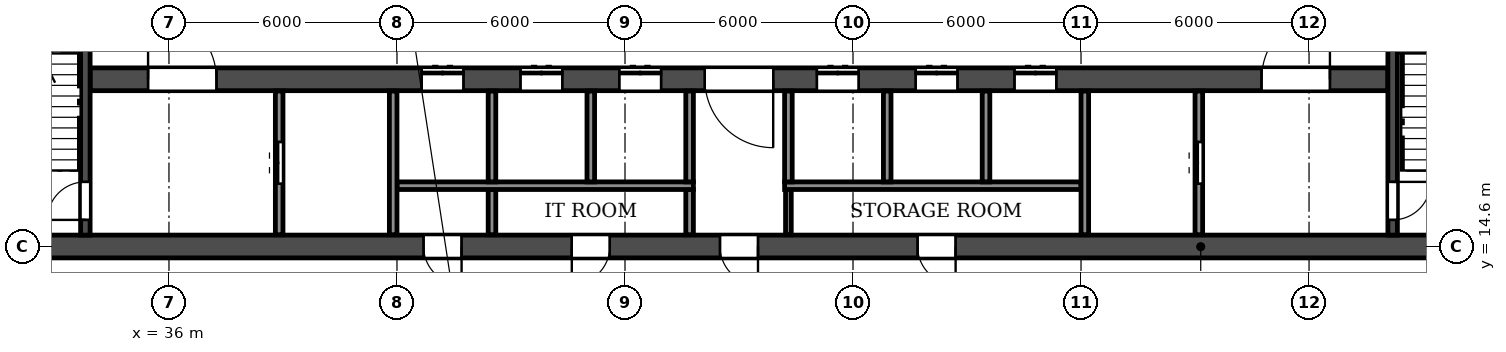
"""IFC4 building model, lengths in metres.
Left out: names, types, materials, properties, quantities, classifications, styles, units other than length and angle.
Written with IfcOpenShell. Run it as: python <this file> out.ifc"""

import sys

from ifc_helpers import new_model, si_unit, direction, frame, frame_2d, origin, place, context, subcontext, project, spatial, rectangle, extrude, element, fill, save


model = new_model("IFC4")
c1 = context("Model", 3, precision=1e-05, world=origin(), true_north=direction((0.0, 1.0)))
c2 = subcontext(c1, "Body", "Model", "MODEL_VIEW")
j1 = project(units=[si_unit("LENGTHUNIT", "METRE"), si_unit("PLANEANGLEUNIT", "RADIAN")], contexts=[c1])
p1 = place(None, origin())
s1 = spatial("IfcSite", under=j1, at=p1, CompositionType="ELEMENT")
p2 = place(p1, origin())
s2 = spatial("IfcBuilding", under=s1, at=p2, CompositionType="ELEMENT")
p3 = place(p2, frame((0.0, 0.0, 26.7)))
s3 = spatial("IfcBuildingStorey", under=s2, at=p3, CompositionType="ELEMENT", Elevation=26.7)
p4 = place(p3, frame((2.6, 14.6, 0.0), z_axis=(0.0, 0.0, 1.0), x_axis=(1.0, 0.0, 0.0)))
e1 = element("IfcWall", 1, at=p4, inside=s3, PredefinedType="SOLIDWALL", context=c2, shape_type="SweptSolid", body=[
    extrude(rectangle(XDim=96.8, YDim=0.6, at=frame_2d((48.4, 0.0))), origin(), (0.0, 0.0, 1.0), 3.05),
])
p5 = place(p4, frame((7.2, 0.0, 0.0)))
e2 = element("IfcOpeningElement", 2, at=p5, cuts=e1, PredefinedType="OPENING", context=c2, shape_type="SweptSolid", body=[
    extrude(rectangle(XDim=1.0, YDim=2.1, at=frame_2d((0.5, 1.05))), frame((0.0, 0.31, 0.0), z_axis=(0.0, -1.0, 0.0), x_axis=(1.0, 0.0, 0.0)), (0.0, 0.0, 1.0), 0.62),
])
p6 = place(p4, frame((16.3, 0.0, 0.0)))
e3 = element("IfcOpeningElement", 3, at=p6, cuts=e1, PredefinedType="OPENING", context=c2, shape_type="SweptSolid", body=[
    extrude(rectangle(XDim=1.0, YDim=2.1, at=frame_2d((0.5, 1.05))), frame((0.0, 0.31, 0.0), z_axis=(0.0, -1.0, 0.0), x_axis=(1.0, 0.0, 0.0)), (0.0, 0.0, 1.0), 0.62),
])
p7 = place(p4, frame((24.2, 0.0, 0.0)))
e4 = element("IfcOpeningElement", 4, at=p7, cuts=e1, PredefinedType="OPENING", context=c2, shape_type="SweptSolid", body=[
    extrude(rectangle(XDim=1.0, YDim=2.1, at=frame_2d((0.5, 1.05))), frame((0.0, 0.31, 0.0), z_axis=(0.0, -1.0, 0.0), x_axis=(1.0, 0.0, 0.0)), (0.0, 0.0, 1.0), 0.62),
])
p8 = place(p4, frame((28.8, 0.0, 0.0)))
e5 = element("IfcOpeningElement", 5, at=p8, cuts=e1, PredefinedType="OPENING", context=c2, shape_type="SweptSolid", body=[
    extrude(rectangle(XDim=1.0, YDim=2.1, at=frame_2d((0.5, 1.05))), frame((0.0, 0.31, 0.0), z_axis=(0.0, -1.0, 0.0), x_axis=(1.0, 0.0, 0.0)), (0.0, 0.0, 1.0), 0.62),
])
p9 = place(p4, frame((40.1, 0.0, 0.0)))
e6 = element("IfcOpeningElement", 6, at=p9, cuts=e1, PredefinedType="OPENING", context=c2, shape_type="SweptSolid", body=[
    extrude(rectangle(XDim=1.0, YDim=2.1, at=frame_2d((0.5, 1.05))), frame((0.0, 0.31, 0.0), z_axis=(0.0, -1.0, 0.0), x_axis=(1.0, 0.0, 0.0)), (0.0, 0.0, 1.0), 0.62),
])
p10 = place(p4, frame((44.0, 0.0, 0.0)))
e7 = element("IfcOpeningElement", 7, at=p10, cuts=e1, PredefinedType="OPENING", context=c2, shape_type="SweptSolid", body=[
    extrude(rectangle(XDim=1.0, YDim=2.1, at=frame_2d((0.5, 1.05))), frame((0.0, 0.31, 0.0), z_axis=(0.0, -1.0, 0.0), x_axis=(1.0, 0.0, 0.0)), (0.0, 0.0, 1.0), 0.62),
])
p11 = place(p4, frame((47.9, 0.0, 0.0)))
e8 = element("IfcOpeningElement", 8, at=p11, cuts=e1, PredefinedType="OPENING", context=c2, shape_type="SweptSolid", body=[
    extrude(rectangle(XDim=1.0, YDim=2.1, at=frame_2d((0.5, 1.05))), frame((0.0, 0.31, 0.0), z_axis=(0.0, -1.0, 0.0), x_axis=(1.0, 0.0, 0.0)), (0.0, 0.0, 1.0), 0.62),
])
p12 = place(p4, frame((53.1, 0.0, 0.0)))
e9 = element("IfcOpeningElement", 9, at=p12, cuts=e1, PredefinedType="OPENING", context=c2, shape_type="SweptSolid", body=[
    extrude(rectangle(XDim=1.0, YDim=2.1, at=frame_2d((0.5, 1.05))), frame((0.0, 0.31, 0.0), z_axis=(0.0, -1.0, 0.0), x_axis=(1.0, 0.0, 0.0)), (0.0, 0.0, 1.0), 0.62),
])
p13 = place(p4, frame((67.0, 0.0, 0.0)))
e10 = element("IfcOpeningElement", 10, at=p13, cuts=e1, PredefinedType="OPENING", context=c2, shape_type="SweptSolid", body=[
    extrude(rectangle(XDim=1.0, YDim=2.1, at=frame_2d((0.5, 1.05))), frame((0.0, 0.31, 0.0), z_axis=(0.0, -1.0, 0.0), x_axis=(1.0, 0.0, 0.0)), (0.0, 0.0, 1.0), 0.62),
])
p14 = place(p4, frame((71.6, 0.0, 0.0)))
e11 = element("IfcOpeningElement", 11, at=p14, cuts=e1, PredefinedType="OPENING", context=c2, shape_type="SweptSolid", body=[
    extrude(rectangle(XDim=1.0, YDim=2.1, at=frame_2d((0.5, 1.05))), frame((0.0, 0.31, 0.0), z_axis=(0.0, -1.0, 0.0), x_axis=(1.0, 0.0, 0.0)), (0.0, 0.0, 1.0), 0.62),
])
p15 = place(p4, frame((79.5, 0.0, 0.0)))
e12 = element("IfcOpeningElement", 12, at=p15, cuts=e1, PredefinedType="OPENING", context=c2, shape_type="SweptSolid", body=[
    extrude(rectangle(XDim=1.0, YDim=2.1, at=frame_2d((0.5, 1.05))), frame((0.0, 0.31, 0.0), z_axis=(0.0, -1.0, 0.0), x_axis=(1.0, 0.0, 0.0)), (0.0, 0.0, 1.0), 0.62),
])
p16 = place(p4, frame((83.15, 0.0, 0.0)))
e13 = element("IfcOpeningElement", 13, at=p16, cuts=e1, PredefinedType="OPENING", context=c2, shape_type="SweptSolid", body=[
    extrude(rectangle(XDim=1.0, YDim=2.1, at=frame_2d((0.5, 1.05))), frame((0.0, 0.31, 0.0), z_axis=(0.0, -1.0, 0.0), x_axis=(1.0, 0.0, 0.0)), (0.0, 0.0, 1.0), 0.62),
])
p17 = place(p4, frame((90.85, 0.0, 0.0)))
e14 = element("IfcOpeningElement", 14, at=p17, cuts=e1, PredefinedType="OPENING", context=c2, shape_type="SweptSolid", body=[
    extrude(rectangle(XDim=1.0, YDim=2.1, at=frame_2d((0.5, 1.05))), frame((0.0, 0.31, 0.0), z_axis=(0.0, -1.0, 0.0), x_axis=(1.0, 0.0, 0.0)), (0.0, 0.0, 1.0), 0.62),
])
p18 = place(p3, frame((33.925, 19.0, 0.0), z_axis=(0.0, 0.0, 1.0), x_axis=(1.0, 0.0, 0.0)))
e15 = element("IfcWall", 15, at=p18, inside=s3, PredefinedType="SOLIDWALL", context=c2, shape_type="SweptSolid", body=[
    extrude(rectangle(XDim=34.15, YDim=0.6, at=frame_2d((17.075, 0.0))), origin(), (0.0, 0.0, 1.0), 3.05),
])
p19 = place(p18, frame((16.175, 0.0, 0.0)))
e16 = element("IfcOpeningElement", 16, at=p19, cuts=e15, PredefinedType="OPENING", context=c2, shape_type="SweptSolid", body=[
    extrude(rectangle(XDim=1.8, YDim=2.1, at=frame_2d((0.9, 1.05))), frame((0.0, 0.31, 0.0), z_axis=(0.0, -1.0, 0.0), x_axis=(1.0, 0.0, 0.0)), (0.0, 0.0, 1.0), 0.62),
])
p20 = place(p18, frame((1.525, 0.0, 0.0)))
e17 = element("IfcOpeningElement", 17, at=p20, cuts=e15, PredefinedType="OPENING", context=c2, shape_type="SweptSolid", body=[
    extrude(rectangle(XDim=1.8, YDim=2.1, at=frame_2d((0.9, 1.05))), frame((0.0, 0.31, 0.0), z_axis=(0.0, -1.0, 0.0), x_axis=(1.0, 0.0, 0.0)), (0.0, 0.0, 1.0), 0.62),
])
p21 = place(p18, frame((8.725, 0.0, 0.0)))
e18 = element("IfcOpeningElement", 18, at=p21, cuts=e15, PredefinedType="OPENING", context=c2, shape_type="SweptSolid", body=[
    extrude(rectangle(XDim=1.1, YDim=2.1, at=frame_2d((0.55, 1.05))), frame((0.0, 0.31, 0.0), z_axis=(0.0, -1.0, 0.0), x_axis=(1.0, 0.0, 0.0)), (0.0, 0.0, 1.0), 0.62),
])
p22 = place(p18, frame((11.325, 0.0, 0.0)))
e19 = element("IfcOpeningElement", 19, at=p22, cuts=e15, PredefinedType="OPENING", context=c2, shape_type="SweptSolid", body=[
    extrude(rectangle(XDim=1.1, YDim=2.1, at=frame_2d((0.55, 1.05))), frame((0.0, 0.31, 0.0), z_axis=(0.0, -1.0, 0.0), x_axis=(1.0, 0.0, 0.0)), (0.0, 0.0, 1.0), 0.62),
])
p23 = place(p18, frame((13.925, 0.0, 0.0)))
e20 = element("IfcOpeningElement", 20, at=p23, cuts=e15, PredefinedType="OPENING", context=c2, shape_type="SweptSolid", body=[
    extrude(rectangle(XDim=1.1, YDim=2.1, at=frame_2d((0.55, 1.05))), frame((0.0, 0.31, 0.0), z_axis=(0.0, -1.0, 0.0), x_axis=(1.0, 0.0, 0.0)), (0.0, 0.0, 1.0), 0.62),
])
p24 = place(p18, frame((19.125, 0.0, 0.0)))
e21 = element("IfcOpeningElement", 21, at=p24, cuts=e15, PredefinedType="OPENING", context=c2, shape_type="SweptSolid", body=[
    extrude(rectangle(XDim=1.1, YDim=2.1, at=frame_2d((0.55, 1.05))), frame((0.0, 0.31, 0.0), z_axis=(0.0, -1.0, 0.0), x_axis=(1.0, 0.0, 0.0)), (0.0, 0.0, 1.0), 0.62),
])
p25 = place(p18, frame((21.725, 0.0, 0.0)))
e22 = element("IfcOpeningElement", 22, at=p25, cuts=e15, PredefinedType="OPENING", context=c2, shape_type="SweptSolid", body=[
    extrude(rectangle(XDim=1.1, YDim=2.1, at=frame_2d((0.55, 1.05))), frame((0.0, 0.31, 0.0), z_axis=(0.0, -1.0, 0.0), x_axis=(1.0, 0.0, 0.0)), (0.0, 0.0, 1.0), 0.62),
])
p26 = place(p18, frame((24.325, 0.0, 0.0)))
e23 = element("IfcOpeningElement", 23, at=p26, cuts=e15, PredefinedType="OPENING", context=c2, shape_type="SweptSolid", body=[
    extrude(rectangle(XDim=1.1, YDim=2.1, at=frame_2d((0.55, 1.05))), frame((0.0, 0.31, 0.0), z_axis=(0.0, -1.0, 0.0), x_axis=(1.0, 0.0, 0.0)), (0.0, 0.0, 1.0), 0.62),
])
p27 = place(p18, frame((30.825, 0.0, 0.0)))
e24 = element("IfcOpeningElement", 24, at=p27, cuts=e15, PredefinedType="OPENING", context=c2, shape_type="SweptSolid", body=[
    extrude(rectangle(XDim=1.8, YDim=2.1, at=frame_2d((0.9, 1.05))), frame((0.0, 0.31, 0.0), z_axis=(0.0, -1.0, 0.0), x_axis=(1.0, 0.0, 0.0)), (0.0, 0.0, 1.0), 0.62),
])
p28 = place(p3, frame((33.8, 14.9, 0.0), z_axis=(0.0, 0.0, 1.0), x_axis=(0.0, 1.0, 0.0)))
e25 = element("IfcWall", 25, at=p28, inside=s3, PredefinedType="SOLIDWALL", context=c2, shape_type="SweptSolid", body=[
    extrude(rectangle(XDim=7.575, YDim=0.25, at=frame_2d((3.788, 0.0))), origin(), (0.0, 0.0, 1.0), 3.05),
])
p29 = place(p28, frame((0.4, 0.0, 0.0)))
e26 = element("IfcOpeningElement", 26, at=p29, cuts=e25, PredefinedType="OPENING", context=c2, shape_type="SweptSolid", body=[
    extrude(rectangle(XDim=1.0, YDim=2.1, at=frame_2d((0.5, 1.05))), frame((0.0, 0.135, 0.0), z_axis=(0.0, -1.0, 0.0), x_axis=(1.0, 0.0, 0.0)), (0.0, 0.0, 1.0), 0.27),
])
p30 = place(p3, frame((68.2, 14.9, 0.0), z_axis=(0.0, 0.0, 1.0), x_axis=(0.0, 1.0, 0.0)))
e27 = element("IfcWall", 27, at=p30, inside=s3, PredefinedType="SOLIDWALL", context=c2, shape_type="SweptSolid", body=[
    extrude(rectangle(XDim=7.575, YDim=0.25, at=frame_2d((3.788, 0.0))), origin(), (0.0, 0.0, 1.0), 3.05),
])
p31 = place(p30, frame((0.4, 0.0, 0.0)))
e28 = element("IfcOpeningElement", 28, at=p31, cuts=e27, PredefinedType="OPENING", context=c2, shape_type="SweptSolid", body=[
    extrude(rectangle(XDim=1.0, YDim=2.1, at=frame_2d((0.5, 1.05))), frame((0.0, 0.135, 0.0), z_axis=(0.0, -1.0, 0.0), x_axis=(1.0, 0.0, 0.0)), (0.0, 0.0, 1.0), 0.27),
])
p32 = place(p3, frame((52.3, 14.91, 0.0), z_axis=(0.0, 0.0, 1.0), x_axis=(0.0, 1.0, 0.0)))
e29 = element("IfcWall", 29, at=p32, inside=s3, PredefinedType="PARTITIONING", context=c2, shape_type="SweptSolid", body=[
    extrude(rectangle(XDim=1.19, YDim=0.15, at=frame_2d((0.595, 0.0))), origin(), (0.0, 0.0, 1.0), 3.05),
])
for number, where, z_axis, x_axis in (
    (30, (44.5, 14.91, 0.0), (0.0, 0.0, 1.0), (0.0, 1.0, 0.0)),
    (31, (49.7, 14.91, 0.0), (0.0, 0.0, 1.0), (0.0, 1.0, 0.0)),
):
    element("IfcWall", number, at=place(p3, frame(where, z_axis=z_axis, x_axis=x_axis)), inside=s3, PredefinedType="PARTITIONING", context=c2, shape_type="SweptSolid", body=[
        extrude(rectangle(XDim=1.19, YDim=0.2, at=frame_2d((0.595, 0.0))), origin(), (0.0, 0.0, 1.0), 3.05),
    ])
for number, where, z_axis, x_axis in (
    (32, (42.0, 16.2, 0.0), (0.0, 0.0, 1.0), (1.0, 0.0, 0.0)),
    (33, (52.2, 16.2, 0.0), (0.0, 0.0, 1.0), (1.0, 0.0, 0.0)),
):
    element("IfcWall", number, at=place(p3, frame(where, z_axis=z_axis, x_axis=x_axis)), inside=s3, PredefinedType="PARTITIONING", context=c2, shape_type="SweptSolid", body=[
        extrude(rectangle(XDim=7.8, YDim=0.2, at=frame_2d((3.9, 0.0))), origin(), (0.0, 0.0, 1.0), 3.05),
    ])
p33 = place(p3, frame((38.9, 14.91, 0.0), z_axis=(0.0, 0.0, 1.0), x_axis=(0.0, 1.0, 0.0)))
e34 = element("IfcWall", 34, at=p33, inside=s3, PredefinedType="PARTITIONING", context=c2, shape_type="SweptSolid", body=[
    extrude(rectangle(XDim=3.78, YDim=0.2, at=frame_2d((1.89, 0.0))), origin(), (0.0, 0.0, 1.0), 3.05),
])
p34 = place(p33, frame((1.34, 0.0, 0.0)))
e35 = element("IfcOpeningElement", 35, at=p34, cuts=e34, PredefinedType="OPENING", context=c2, shape_type="SweptSolid", body=[
    extrude(rectangle(XDim=1.1, YDim=2.1, at=frame_2d((0.55, 1.05))), frame((0.0, 0.11, 0.0), z_axis=(0.0, -1.0, 0.0), x_axis=(1.0, 0.0, 0.0)), (0.0, 0.0, 1.0), 0.22),
])
p35 = place(p3, frame((41.9, 14.91, 0.0), z_axis=(0.0, 0.0, 1.0), x_axis=(0.0, 1.0, 0.0)))
e36 = element("IfcWall", 36, at=p35, inside=s3, PredefinedType="PARTITIONING", context=c2, shape_type="SweptSolid", body=[
    extrude(rectangle(XDim=3.78, YDim=0.2, at=frame_2d((1.89, 0.0))), origin(), (0.0, 0.0, 1.0), 3.05),
])
for number, where, z_axis, x_axis in (
    (37, (44.5, 16.3, 0.0), (0.0, 0.0, 1.0), (0.0, 1.0, 0.0)),
    (38, (47.1, 16.3, 0.0), (0.0, 0.0, 1.0), (0.0, 1.0, 0.0)),
    (39, (49.7, 16.3, 0.0), (0.0, 0.0, 1.0), (0.0, 1.0, 0.0)),
    (40, (52.3, 16.3, 0.0), (0.0, 0.0, 1.0), (0.0, 1.0, 0.0)),
    (41, (54.9, 16.3, 0.0), (0.0, 0.0, 1.0), (0.0, 1.0, 0.0)),
    (42, (57.5, 16.3, 0.0), (0.0, 0.0, 1.0), (0.0, 1.0, 0.0)),
):
    element("IfcWall", number, at=place(p3, frame(where, z_axis=z_axis, x_axis=x_axis)), inside=s3, PredefinedType="PARTITIONING", context=c2, shape_type="SweptSolid", body=[
        extrude(rectangle(XDim=2.39, YDim=0.2, at=frame_2d((1.195, 0.0))), origin(), (0.0, 0.0, 1.0), 3.05),
    ])
p36 = place(p3, frame((60.1, 14.91, 0.0), z_axis=(0.0, 0.0, 1.0), x_axis=(0.0, 1.0, 0.0)))
e43 = element("IfcWall", 43, at=p36, inside=s3, PredefinedType="PARTITIONING", context=c2, shape_type="SweptSolid", body=[
    extrude(rectangle(XDim=3.78, YDim=0.2, at=frame_2d((1.89, 0.0))), origin(), (0.0, 0.0, 1.0), 3.05),
])
p37 = place(p3, frame((63.1, 14.91, 0.0), z_axis=(0.0, 0.0, 1.0), x_axis=(0.0, 1.0, 0.0)))
e44 = element("IfcWall", 44, at=p37, inside=s3, PredefinedType="PARTITIONING", context=c2, shape_type="SweptSolid", body=[
    extrude(rectangle(XDim=3.78, YDim=0.2, at=frame_2d((1.89, 0.0))), origin(), (0.0, 0.0, 1.0), 3.05),
])
p38 = place(p37, frame((1.34, 0.0, 0.0)))
e45 = element("IfcOpeningElement", 45, at=p38, cuts=e44, PredefinedType="OPENING", context=c2, shape_type="SweptSolid", body=[
    extrude(rectangle(XDim=1.1, YDim=2.1, at=frame_2d((0.55, 1.05))), frame((0.0, 0.11, 0.0), z_axis=(0.0, -1.0, 0.0), x_axis=(1.0, 0.0, 0.0)), (0.0, 0.0, 1.0), 0.22),
])
p39 = place(p9, frame((1.0, 0.0, 0.0), z_axis=(0.0, 0.0, 1.0), x_axis=(-1.0, 0.0, 0.0)))
e46 = element("IfcDoor", 46, at=p39, inside=s3, OperationType="SINGLE_SWING_LEFT", PredefinedType="DOOR", context=c2, shape_type="SweptSolid", body=[
    extrude(rectangle(XDim=1.0, YDim=2.1, at=frame_2d((0.5, 1.05))), frame((0.0, 0.025, 0.0), z_axis=(0.0, -1.0, 0.0), x_axis=(1.0, 0.0, 0.0)), (0.0, 0.0, 1.0), 0.05),
])
fill(e6, e46)
p40 = place(p10, frame((1.0, 0.0, 0.0), z_axis=(0.0, 0.0, 1.0), x_axis=(-1.0, 0.0, 0.0)))
e47 = element("IfcDoor", 47, at=p40, inside=s3, OperationType="SINGLE_SWING_RIGHT", PredefinedType="DOOR", context=c2, shape_type="SweptSolid", body=[
    extrude(rectangle(XDim=1.0, YDim=2.1, at=frame_2d((0.5, 1.05))), frame((0.0, 0.025, 0.0), z_axis=(0.0, -1.0, 0.0), x_axis=(1.0, 0.0, 0.0)), (0.0, 0.0, 1.0), 0.05),
])
fill(e7, e47)
p41 = place(p11, frame((1.0, 0.0, 0.0), z_axis=(0.0, 0.0, 1.0), x_axis=(-1.0, 0.0, 0.0)))
e48 = element("IfcDoor", 48, at=p41, inside=s3, OperationType="SINGLE_SWING_LEFT", PredefinedType="DOOR", context=c2, shape_type="SweptSolid", body=[
    extrude(rectangle(XDim=1.0, YDim=2.1, at=frame_2d((0.5, 1.05))), frame((0.0, 0.025, 0.0), z_axis=(0.0, -1.0, 0.0), x_axis=(1.0, 0.0, 0.0)), (0.0, 0.0, 1.0), 0.05),
])
fill(e8, e48)
p42 = place(p12, frame((1.0, 0.0, 0.0), z_axis=(0.0, 0.0, 1.0), x_axis=(-1.0, 0.0, 0.0)))
e49 = element("IfcDoor", 49, at=p42, inside=s3, OperationType="SINGLE_SWING_LEFT", PredefinedType="DOOR", context=c2, shape_type="SweptSolid", body=[
    extrude(rectangle(XDim=1.0, YDim=2.1, at=frame_2d((0.5, 1.05))), frame((0.0, 0.025, 0.0), z_axis=(0.0, -1.0, 0.0), x_axis=(1.0, 0.0, 0.0)), (0.0, 0.0, 1.0), 0.05),
])
fill(e9, e49)
p43 = place(p38, origin())
e50 = element("IfcDoor", 50, at=p43, inside=s3, OperationType="DOUBLE_DOOR_SLIDING", PredefinedType="DOOR", context=c2, shape_type="SweptSolid", body=[
    extrude(rectangle(XDim=1.1, YDim=2.1, at=frame_2d((0.55, 1.05))), frame((0.0, 0.025, 0.0), z_axis=(0.0, -1.0, 0.0), x_axis=(1.0, 0.0, 0.0)), (0.0, 0.0, 1.0), 0.05),
])
fill(e45, e50)
p44 = place(p31, frame((1.0, 0.0, 0.0), z_axis=(0.0, 0.0, 1.0), x_axis=(-1.0, 0.0, 0.0)))
e51 = element("IfcDoor", 51, at=p44, inside=s3, OperationType="SINGLE_SWING_LEFT", PredefinedType="DOOR", context=c2, shape_type="SweptSolid", body=[
    extrude(rectangle(XDim=1.0, YDim=2.1, at=frame_2d((0.5, 1.05))), frame((0.0, 0.025, 0.0), z_axis=(0.0, -1.0, 0.0), x_axis=(1.0, 0.0, 0.0)), (0.0, 0.0, 1.0), 0.05),
])
fill(e28, e51)
p45 = place(p29, origin())
e52 = element("IfcDoor", 52, at=p45, inside=s3, OperationType="SINGLE_SWING_LEFT", PredefinedType="DOOR", context=c2, shape_type="SweptSolid", body=[
    extrude(rectangle(XDim=1.0, YDim=2.1, at=frame_2d((0.5, 1.05))), frame((0.0, 0.025, 0.0), z_axis=(0.0, -1.0, 0.0), x_axis=(1.0, 0.0, 0.0)), (0.0, 0.0, 1.0), 0.05),
])
fill(e26, e52)
p46 = place(p34, origin())
e53 = element("IfcDoor", 53, at=p46, inside=s3, OperationType="DOUBLE_DOOR_SLIDING", PredefinedType="DOOR", context=c2, shape_type="SweptSolid", body=[
    extrude(rectangle(XDim=1.1, YDim=2.1, at=frame_2d((0.55, 1.05))), frame((0.0, 0.025, 0.0), z_axis=(0.0, -1.0, 0.0), x_axis=(1.0, 0.0, 0.0)), (0.0, 0.0, 1.0), 0.05),
])
fill(e35, e53)
p47 = place(p19, frame((1.8, 0.0, 0.0), z_axis=(0.0, 0.0, 1.0), x_axis=(-1.0, 0.0, 0.0)))
e54 = element("IfcDoor", 54, at=p47, inside=s3, OperationType="DOUBLE_DOOR_SINGLE_SWING", PredefinedType="DOOR", context=c2, shape_type="SweptSolid", body=[
    extrude(rectangle(XDim=1.8, YDim=2.1, at=frame_2d((0.9, 1.05))), frame((0.0, 0.025, 0.0), z_axis=(0.0, -1.0, 0.0), x_axis=(1.0, 0.0, 0.0)), (0.0, 0.0, 1.0), 0.05),
])
fill(e16, e54)
p48 = place(p20, origin())
e55 = element("IfcDoor", 55, at=p48, inside=s3, OperationType="DOUBLE_DOOR_SINGLE_SWING", PredefinedType="DOOR", context=c2, shape_type="SweptSolid", body=[
    extrude(rectangle(XDim=1.8, YDim=2.1, at=frame_2d((0.9, 1.05))), frame((0.0, 0.025, 0.0), z_axis=(0.0, -1.0, 0.0), x_axis=(1.0, 0.0, 0.0)), (0.0, 0.0, 1.0), 0.05),
])
fill(e17, e55)
p49 = place(p21, origin())
e56 = element("IfcDoor", 56, at=p49, inside=s3, OperationType="DOUBLE_DOOR_SLIDING", PredefinedType="DOOR", context=c2, shape_type="SweptSolid", body=[
    extrude(rectangle(XDim=1.1, YDim=2.1, at=frame_2d((0.55, 1.05))), frame((0.0, 0.025, 0.0), z_axis=(0.0, -1.0, 0.0), x_axis=(1.0, 0.0, 0.0)), (0.0, 0.0, 1.0), 0.05),
])
fill(e18, e56)
p50 = place(p22, origin())
e57 = element("IfcDoor", 57, at=p50, inside=s3, OperationType="DOUBLE_DOOR_SLIDING", PredefinedType="DOOR", context=c2, shape_type="SweptSolid", body=[
    extrude(rectangle(XDim=1.1, YDim=2.1, at=frame_2d((0.55, 1.05))), frame((0.0, 0.025, 0.0), z_axis=(0.0, -1.0, 0.0), x_axis=(1.0, 0.0, 0.0)), (0.0, 0.0, 1.0), 0.05),
])
fill(e19, e57)
p51 = place(p23, origin())
e58 = element("IfcDoor", 58, at=p51, inside=s3, OperationType="DOUBLE_DOOR_SLIDING", PredefinedType="DOOR", context=c2, shape_type="SweptSolid", body=[
    extrude(rectangle(XDim=1.1, YDim=2.1, at=frame_2d((0.55, 1.05))), frame((0.0, 0.025, 0.0), z_axis=(0.0, -1.0, 0.0), x_axis=(1.0, 0.0, 0.0)), (0.0, 0.0, 1.0), 0.05),
])
fill(e20, e58)
p52 = place(p24, origin())
e59 = element("IfcDoor", 59, at=p52, inside=s3, OperationType="DOUBLE_DOOR_SLIDING", PredefinedType="DOOR", context=c2, shape_type="SweptSolid", body=[
    extrude(rectangle(XDim=1.1, YDim=2.1, at=frame_2d((0.55, 1.05))), frame((0.0, 0.025, 0.0), z_axis=(0.0, -1.0, 0.0), x_axis=(1.0, 0.0, 0.0)), (0.0, 0.0, 1.0), 0.05),
])
fill(e21, e59)
p53 = place(p25, origin())
e60 = element("IfcDoor", 60, at=p53, inside=s3, OperationType="DOUBLE_DOOR_SLIDING", PredefinedType="DOOR", context=c2, shape_type="SweptSolid", body=[
    extrude(rectangle(XDim=1.1, YDim=2.1, at=frame_2d((0.55, 1.05))), frame((0.0, 0.025, 0.0), z_axis=(0.0, -1.0, 0.0), x_axis=(1.0, 0.0, 0.0)), (0.0, 0.0, 1.0), 0.05),
])
fill(e22, e60)
p54 = place(p26, origin())
e61 = element("IfcDoor", 61, at=p54, inside=s3, OperationType="DOUBLE_DOOR_SLIDING", PredefinedType="DOOR", context=c2, shape_type="SweptSolid", body=[
    extrude(rectangle(XDim=1.1, YDim=2.1, at=frame_2d((0.55, 1.05))), frame((0.0, 0.025, 0.0), z_axis=(0.0, -1.0, 0.0), x_axis=(1.0, 0.0, 0.0)), (0.0, 0.0, 1.0), 0.05),
])
fill(e23, e61)
p55 = place(p27, origin())
e62 = element("IfcDoor", 62, at=p55, inside=s3, OperationType="DOUBLE_DOOR_SINGLE_SWING", PredefinedType="DOOR", context=c2, shape_type="SweptSolid", body=[
    extrude(rectangle(XDim=1.8, YDim=2.1, at=frame_2d((0.9, 1.05))), frame((0.0, 0.025, 0.0), z_axis=(0.0, -1.0, 0.0), x_axis=(1.0, 0.0, 0.0)), (0.0, 0.0, 1.0), 0.05),
])
fill(e24, e62)
save(model, sys.argv[1])
